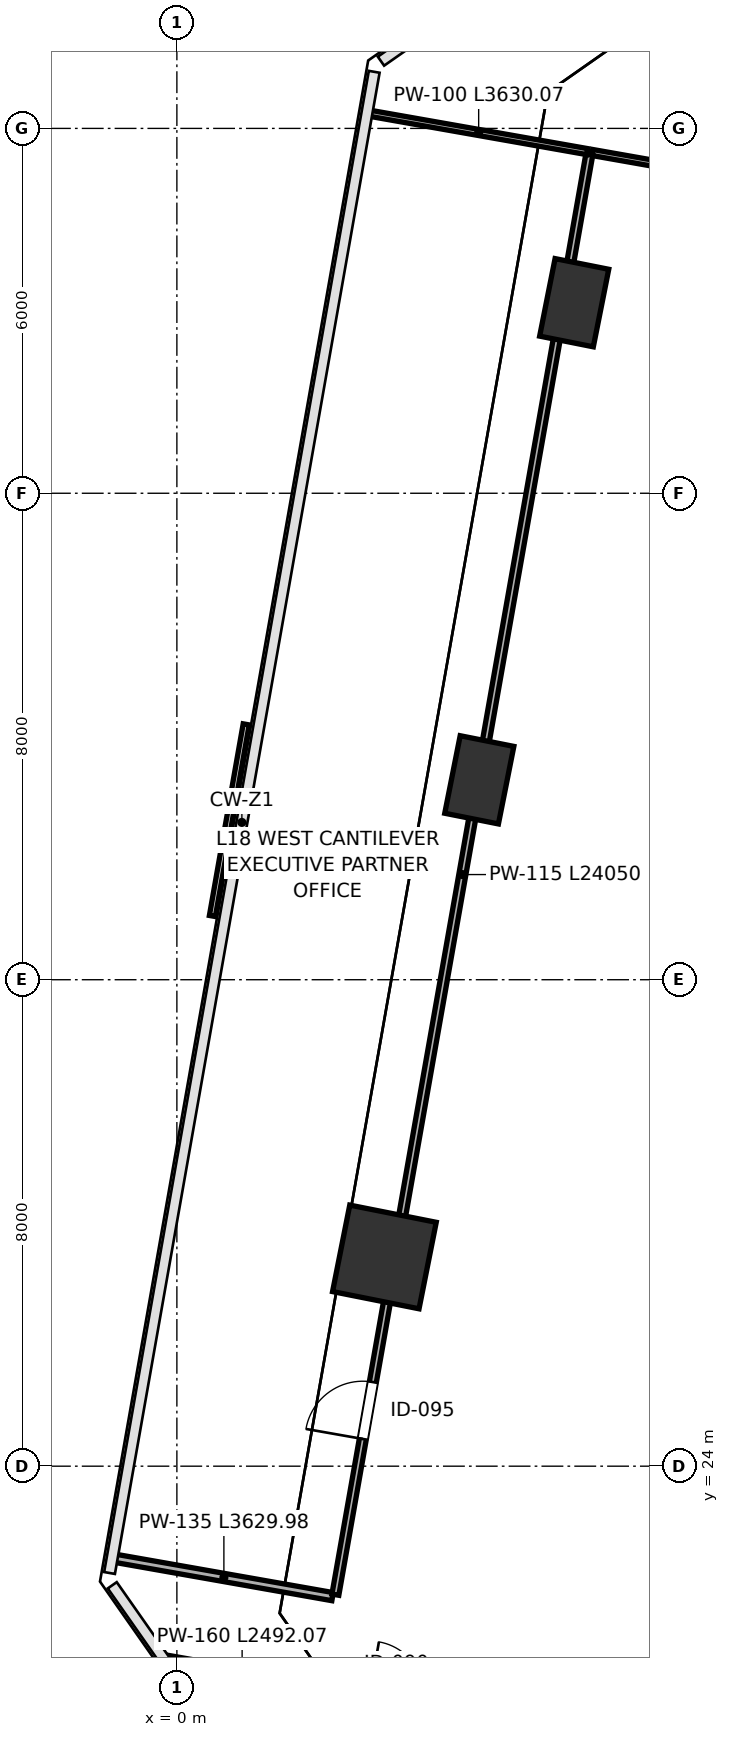
"""IFC4 building model, lengths in metres.
Left out: names, types, materials, properties, quantities, classifications, styles, units other than length and angle.
Written with IfcOpenShell. Run it as: python <this file> out.ifc"""

import sys

from ifc_helpers import new_model, si_unit, direction, frame, frame_2d, origin, origin_2d, place, context, subcontext, project, spatial, rectangle, extrude, clip, halfspace, source, transform, mapped, element, fill, save


model = new_model("IFC4")
c1 = context("Model", 3, precision=1e-05, world=origin(), true_north=direction((0.0, 1.0)))
c2 = subcontext(c1, "Body", "Model", "MODEL_VIEW")
j1 = project(units=[si_unit("LENGTHUNIT", "METRE"), si_unit("PLANEANGLEUNIT", "RADIAN")], contexts=[c1])
p1 = place(None, origin())
s1 = spatial("IfcSite", under=j1, at=p1, CompositionType="ELEMENT")
p2 = place(p1, origin())
s2 = spatial("IfcBuilding", under=s1, at=p2, CompositionType="ELEMENT")
p3 = place(p2, frame((0.0, 0.0, 83.2)))
s3 = spatial("IfcBuildingStorey", under=s2, at=p3, CompositionType="ELEMENT", Elevation=83.2)
p4 = place(p3, frame((3.413, 27.441, 0.0), z_axis=(-0.022564738885, 0.093788312134, 0.995336418035), x_axis=(0.998997038041, 0.040629443972, 0.018819305712)))
e1 = element("IfcColumn", 1, at=p4, inside=s3, PredefinedType="COLUMN", context=c2, shape_type="Clipping", body=[
    clip(clip(extrude(rectangle(XDim=1.45, YDim=1.45, at=origin_2d()), origin(), (0.0, 0.0, 1.0), 4.22), halfspace(frame((0.0, 0.0, 0.083), z_axis=(0.0, 0.0, -1.0), x_axis=(1.0, 0.0, 0.0)), False)), halfspace(frame((0.0, 0.0, 4.136), z_axis=(0.0, 0.0, 1.0), x_axis=(1.0, 0.0, 0.0)), False)),
])
p5 = place(p3, frame((4.974, 35.287, 0.0), z_axis=(0.017893633149, 0.085298775496, 0.99619472835), x_axis=(0.919991135034, -0.391570177002, 0.017003174446)))
e2 = element("IfcColumn", 2, at=p5, inside=s3, PredefinedType="PILASTER", context=c2, shape_type="Clipping", body=[
    clip(clip(extrude(rectangle(XDim=0.9, YDim=1.3, at=origin_2d()), origin(), (0.0, 0.0, 1.0), 4.216), halfspace(frame((0.0, 0.0, 0.064), z_axis=(0.0, 0.0, -1.0), x_axis=(1.0, 0.0, 0.0)), False)), halfspace(frame((0.0, 0.0, 4.152), z_axis=(0.0, 0.0, 1.0), x_axis=(1.0, 0.0, 0.0)), False)),
])
p6 = place(p3, frame((6.534, 43.134, 0.0), z_axis=(0.058436761901, 0.076777804992, 0.995334272252), x_axis=(0.662840315572, -0.748524139363, 0.018823624612)))
e3 = element("IfcColumn", 3, at=p6, inside=s3, PredefinedType="PILASTER", context=c2, shape_type="Clipping", body=[
    clip(clip(extrude(rectangle(XDim=0.9, YDim=1.3, at=origin_2d()), origin(), (0.0, 0.0, 1.0), 4.22), halfspace(frame((0.0, 0.0, 0.071), z_axis=(0.0, 0.0, -1.0), x_axis=(1.0, 0.0, 0.0)), False)), halfspace(frame((0.0, 0.0, 4.149), z_axis=(0.0, 0.0, 1.0), x_axis=(1.0, 0.0, 0.0)), False)),
])
p7 = place(p3, frame((-0.154, 20.81, 0.0), z_axis=(0.0, 0.0, 1.0), x_axis=(0.984798349436, -0.173701499557, 0.0)))
e4 = element("IfcWall", 4, at=p7, inside=s3, PredefinedType="PARTITIONING", context=c2, shape_type="SweptSolid", body=[
    extrude(rectangle(XDim=2.492, YDim=0.16, at=frame_2d((1.246, 0.0))), origin(), (0.0, 0.0, 1.0), 3.96),
])
p8 = place(p3, frame((6.83, 45.604, 0.0), z_axis=(0.0, 0.0, 1.0), x_axis=(0.984806496121, -0.173655305701, 0.0)))
e5 = element("IfcWall", 5, at=p8, inside=s3, PredefinedType="PARTITIONING", context=c2, shape_type="SweptSolid", body=[
    extrude(rectangle(XDim=25.6, YDim=0.1, at=frame_2d((12.8, 0.0))), origin(), (0.0, 0.0, 1.0), 3.96),
])
p9 = place(p8, frame((1.05, 0.0, 0.0)))
e6 = element("IfcOpeningElement", 6, at=p9, cuts=e5, PredefinedType="OPENING", context=c2, shape_type="SweptSolid", body=[
    extrude(rectangle(XDim=0.95, YDim=2.15, at=frame_2d((0.475, 1.075))), frame((0.0, 0.06, 0.0), z_axis=(0.0, -1.0, 0.0), x_axis=(1.0, 0.0, 0.0)), (0.0, 0.0, 1.0), 0.12),
])
p10 = place(p3, frame((-1.014, 22.485, 0.0), z_axis=(0.0, 0.0, 1.0), x_axis=(0.984795743306, -0.173716274326, 0.0)))
e7 = element("IfcWall", 7, at=p10, inside=s3, PredefinedType="PARTITIONING", context=c2, shape_type="SweptSolid", body=[
    extrude(rectangle(XDim=3.63, YDim=0.135, at=frame_2d((1.815, 0.0))), origin(), (0.0, 0.0, 1.0), 3.96),
])
p11 = place(p3, frame((2.607, 21.887, 0.0), z_axis=(0.0, 0.0, 1.0), x_axis=(0.173659666579, 0.984805727138, 0.0)))
e8 = element("IfcWall", 8, at=p11, inside=s3, PredefinedType="PARTITIONING", context=c2, shape_type="SweptSolid", body=[
    extrude(rectangle(XDim=24.05, YDim=0.115, at=frame_2d((12.025, 0.0))), origin(), (0.0, 0.0, 1.0), 3.095),
])
p12 = place(p11, frame((2.6, 0.0, 0.0)))
e9 = element("IfcOpeningElement", 9, at=p12, cuts=e8, PredefinedType="OPENING", context=c2, shape_type="SweptSolid", body=[
    extrude(rectangle(XDim=0.95, YDim=2.15, at=frame_2d((0.475, 1.075))), frame((0.0, 0.067, 0.0), z_axis=(0.0, -1.0, 0.0), x_axis=(1.0, 0.0, 0.0)), (0.0, 0.0, 1.0), 0.135),
])
p13 = place(p3, frame((3.176, 46.249, 0.0), z_axis=(0.0, 0.0, 1.0), x_axis=(0.984795743306, -0.173716274326, 0.0)))
e10 = element("IfcWall", 10, at=p13, inside=s3, PredefinedType="PARTITIONING", context=c2, shape_type="SweptSolid", body=[
    extrude(rectangle(XDim=3.63, YDim=0.1, at=frame_2d((1.815, 0.0))), origin(), (0.0, 0.0, 1.0), 3.96),
])
m1 = source(origin(), c2, "Body", "SweptSolid", [
    extrude(rectangle(XDim=0.95, YDim=2.15, at=frame_2d((0.475, 1.075))), frame((0.0, 0.025, 0.0), z_axis=(0.0, -1.0, 0.0), x_axis=(1.0, 0.0, 0.0)), (0.0, 0.0, 1.0), 0.05),
])
p14 = place(p12, origin())
e11 = element("IfcDoor", 11, at=p14, inside=s3, OperationType="SINGLE_SWING_LEFT", PredefinedType="DOOR", context=c2, shape_type="MappedRepresentation", body=[
    mapped(m1, transform((0.0, 0.0, 0.0), scale=1.0)),
])
fill(e9, e11)
save(model, sys.argv[1])
